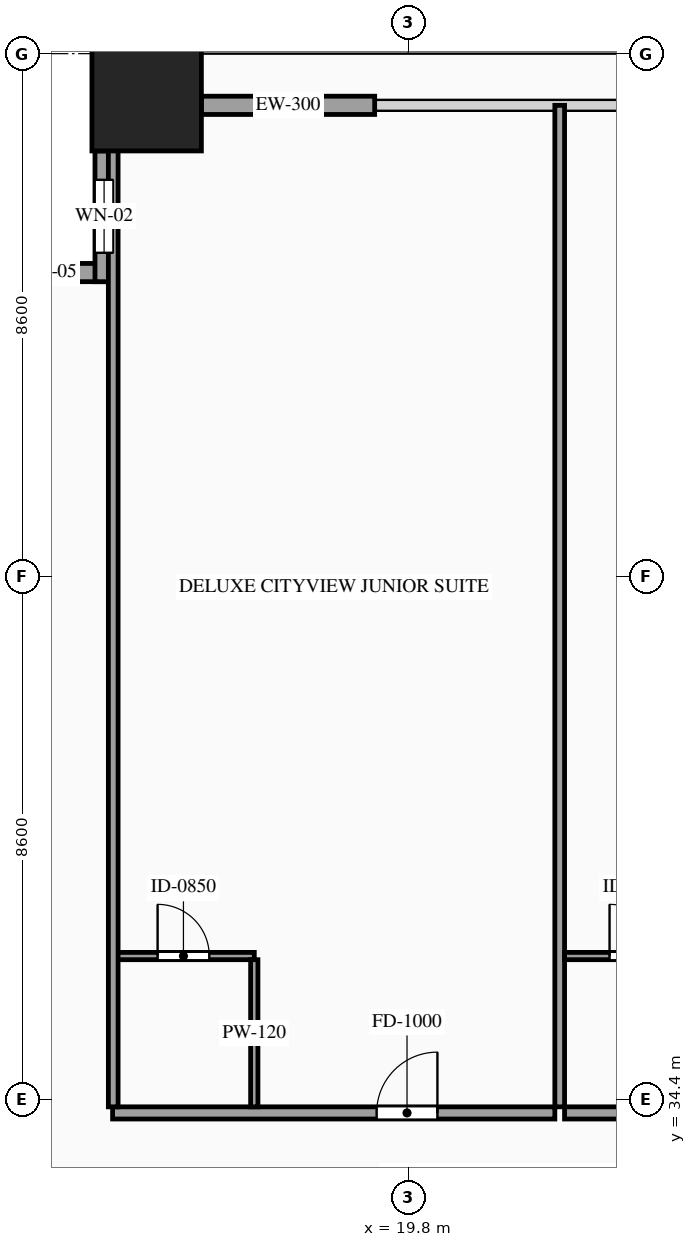
"""IFC4 building model, lengths in metres.
Left out: names, types, materials, properties, quantities, classifications, styles, units other than length and angle.
Written with IfcOpenShell. Run it as: python <this file> out.ifc"""

import sys

from ifc_helpers import new_model, si_unit, direction, frame, frame_2d, origin, origin_2d, place, context, subcontext, project, spatial, rectangle, hollow_rectangle, extrude, source, transform, mapped, element, fill, save


model = new_model("IFC4")
c1 = context("Model", 3, precision=1e-05, world=origin(), true_north=direction((0.0, 1.0)))
c2 = subcontext(c1, "Body", "Model", "MODEL_VIEW")
j1 = project(units=[si_unit("LENGTHUNIT", "METRE"), si_unit("PLANEANGLEUNIT", "RADIAN")], contexts=[c1])
p1 = place(None, origin())
s1 = spatial("IfcSite", under=j1, at=p1, CompositionType="ELEMENT")
p2 = place(p1, origin())
s2 = spatial("IfcBuilding", under=s1, at=p2, CompositionType="ELEMENT")
p3 = place(p2, frame((0.0, 0.0, 37.8)))
s3 = spatial("IfcBuildingStorey", under=s2, at=p3, CompositionType="ELEMENT", Elevation=37.8)
m1 = source(origin(), c2, "Body", "SweptSolid", [
    extrude(hollow_rectangle(XDim=1.8, YDim=1.8, WallThickness=0.08, at=origin_2d()), origin(), (0.0, 0.0, 1.0), 3.6),
])
p4 = place(p3, frame((15.5, 50.9, 0.0), z_axis=(0.0, 0.0, 1.0), x_axis=(1.0, 0.0, 0.0)))
e1 = element("IfcColumn", 1, at=p4, inside=s3, PredefinedType="COLUMN", context=c2, shape_type="MappedRepresentation", body=[
    mapped(m1, transform((0.0, 0.0, 0.0), scale=1.0)),
])
p5 = place(p3, frame((14.95, 48.0, 0.0), z_axis=(0.0, 0.0, 1.0), x_axis=(-1.0, 0.0, 0.0)))
e2 = element("IfcWall", 2, at=p5, inside=s3, PredefinedType="SOLIDWALL", context=c2, shape_type="SweptSolid", body=[
    extrude(rectangle(XDim=2.15, YDim=0.3, at=frame_2d((1.075, 0.0))), origin(), (0.0, 0.0, 1.0), 3.32),
])
p6 = place(p5, frame((0.625, 0.0, 0.85)))
e3 = element("IfcOpeningElement", 3, at=p6, cuts=e2, PredefinedType="OPENING", context=c2, shape_type="SweptSolid", body=[
    extrude(rectangle(XDim=0.9, YDim=1.5, at=frame_2d((0.45, 0.75))), frame((0.0, 0.165, 0.0), z_axis=(0.0, -1.0, 0.0), x_axis=(1.0, 0.0, 0.0)), (0.0, 0.0, 1.0), 0.33),
])
p7 = place(p3, frame((14.8, 50.0, 0.0), z_axis=(0.0, 0.0, 1.0), x_axis=(0.0, -1.0, 0.0)))
e4 = element("IfcWall", 4, at=p7, inside=s3, PredefinedType="SOLIDWALL", context=c2, shape_type="SweptSolid", body=[
    extrude(rectangle(XDim=2.15, YDim=0.3, at=frame_2d((1.075, 0.0))), origin(), (0.0, 0.0, 1.0), 3.32),
])
p8 = place(p7, frame((0.475, 0.0, 0.85)))
e5 = element("IfcOpeningElement", 5, at=p8, cuts=e4, PredefinedType="OPENING", context=c2, shape_type="SweptSolid", body=[
    extrude(rectangle(XDim=1.2, YDim=2.1, at=frame_2d((0.6, 1.05))), frame((0.0, 0.165, 0.0), z_axis=(0.0, -1.0, 0.0), x_axis=(1.0, 0.0, 0.0)), (0.0, 0.0, 1.0), 0.33),
])
m2 = source(origin(), c2, "Body", "SweptSolid", [
    extrude(rectangle(XDim=2.85, YDim=0.3, at=frame_2d((1.425, 0.0))), origin(), (0.0, 0.0, 1.0), 2.715),
])
p9 = place(p3, frame((16.4, 50.75, 0.0), z_axis=(0.0, 0.0, 1.0), x_axis=(1.0, 0.0, 0.0)))
e6 = element("IfcWall", 6, at=p9, inside=s3, PredefinedType="SOLIDWALL", context=c2, shape_type="MappedRepresentation", body=[
    mapped(m2, transform((0.0, 0.0, 0.0), scale=1.0)),
])
p10 = place(p3, frame((14.94, 34.18, 0.0), z_axis=(0.0, 0.0, 1.0), x_axis=(1.0, 0.0, 0.0)))
e7 = element("IfcWall", 7, at=p10, inside=s3, PredefinedType="PARTITIONING", context=c2, shape_type="SweptSolid", body=[
    extrude(rectangle(XDim=7.273, YDim=0.2, at=frame_2d((3.636, 0.0))), origin(), (0.0, 0.0, 1.0), 3.32),
])
p11 = place(p10, frame((4.342, 0.0, 0.0)))
e8 = element("IfcOpeningElement", 8, at=p11, cuts=e7, PredefinedType="OPENING", context=c2, shape_type="SweptSolid", body=[
    extrude(rectangle(XDim=1.0, YDim=2.2, at=frame_2d((0.5, 1.1))), frame((0.0, 0.115, 0.0), z_axis=(0.0, -1.0, 0.0), x_axis=(1.0, 0.0, 0.0)), (0.0, 0.0, 1.0), 0.23),
])
m3 = source(origin(), c2, "Body", "SweptSolid", [
    extrude(rectangle(XDim=16.47, YDim=0.16, at=frame_2d((8.235, 0.0))), origin(), (0.0, 0.0, 1.0), 3.32),
])
p12 = place(p3, frame((22.293, 34.28, 0.0), z_axis=(0.0, 0.0, 1.0), x_axis=(0.0, 1.0, 0.0)))
e9 = element("IfcWall", 9, at=p12, inside=s3, PredefinedType="PARTITIONING", context=c2, shape_type="MappedRepresentation", body=[
    mapped(m3, transform((0.0, 0.0, 0.0), scale=1.0)),
])
p13 = place(p3, frame((14.94, 36.76, 0.0), z_axis=(0.0, 0.0, 1.0), x_axis=(1.0, 0.0, 0.0)))
e10 = element("IfcWall", 10, at=p13, inside=s3, PredefinedType="PARTITIONING", context=c2, shape_type="SweptSolid", body=[
    extrude(rectangle(XDim=2.33, YDim=0.12, at=frame_2d((1.165, 0.0))), origin(), (0.0, 0.0, 1.0), 3.32),
])
p14 = place(p13, frame((0.74, 0.0, 0.0)))
e11 = element("IfcOpeningElement", 11, at=p14, cuts=e10, PredefinedType="OPENING", context=c2, shape_type="SweptSolid", body=[
    extrude(rectangle(XDim=0.85, YDim=2.1, at=frame_2d((0.425, 1.05))), frame((0.0, 0.075, 0.0), z_axis=(0.0, -1.0, 0.0), x_axis=(1.0, 0.0, 0.0)), (0.0, 0.0, 1.0), 0.15),
])
m4 = source(origin(), c2, "Body", "SweptSolid", [
    extrude(rectangle(XDim=2.42, YDim=0.12, at=frame_2d((1.21, 0.0))), origin(), (0.0, 0.0, 1.0), 3.32),
])
p15 = place(p3, frame((17.27, 34.28, 0.0), z_axis=(0.0, 0.0, 1.0), x_axis=(0.0, 1.0, 0.0)))
e12 = element("IfcWall", 12, at=p15, inside=s3, PredefinedType="PARTITIONING", context=c2, shape_type="MappedRepresentation", body=[
    mapped(m4, transform((0.0, 0.0, 0.0), scale=1.0)),
])
p16 = place(p3, frame((22.373, 34.18, 0.0), z_axis=(0.0, 0.0, 1.0), x_axis=(1.0, 0.0, 0.0)))
e13 = element("IfcWall", 13, at=p16, inside=s3, PredefinedType="PARTITIONING", context=c2, shape_type="SweptSolid", body=[
    extrude(rectangle(XDim=7.194, YDim=0.2, at=frame_2d((3.597, 0.0))), origin(), (0.0, 0.0, 1.0), 3.32),
])
p17 = place(p16, frame((4.302, 0.0, 0.0)))
e14 = element("IfcOpeningElement", 14, at=p17, cuts=e13, PredefinedType="OPENING", context=c2, shape_type="SweptSolid", body=[
    extrude(rectangle(XDim=1.0, YDim=2.2, at=frame_2d((0.5, 1.1))), frame((0.0, 0.115, 0.0), z_axis=(0.0, -1.0, 0.0), x_axis=(1.0, 0.0, 0.0)), (0.0, 0.0, 1.0), 0.23),
])
p18 = place(p3, frame((22.373, 36.76, 0.0), z_axis=(0.0, 0.0, 1.0), x_axis=(1.0, 0.0, 0.0)))
e15 = element("IfcWall", 15, at=p18, inside=s3, PredefinedType="PARTITIONING", context=c2, shape_type="SweptSolid", body=[
    extrude(rectangle(XDim=2.33, YDim=0.12, at=frame_2d((1.165, 0.0))), origin(), (0.0, 0.0, 1.0), 3.32),
])
p19 = place(p18, frame((0.74, 0.0, 0.0)))
e16 = element("IfcOpeningElement", 16, at=p19, cuts=e15, PredefinedType="OPENING", context=c2, shape_type="SweptSolid", body=[
    extrude(rectangle(XDim=0.85, YDim=2.1, at=frame_2d((0.425, 1.05))), frame((0.0, 0.075, 0.0), z_axis=(0.0, -1.0, 0.0), x_axis=(1.0, 0.0, 0.0)), (0.0, 0.0, 1.0), 0.15),
])
m5 = source(origin(), c2, "Body", "SweptSolid", [
    extrude(rectangle(XDim=16.32, YDim=0.16, at=frame_2d((8.16, 0.0))), origin(), (0.0, 0.0, 1.0), 3.32),
])
p20 = place(p3, frame((14.95, 34.28, 0.0), z_axis=(0.0, 0.0, 1.0), x_axis=(0.0, 1.0, 0.0)))
e17 = element("IfcWall", 17, at=p20, inside=s3, PredefinedType="PARTITIONING", context=c2, shape_type="MappedRepresentation", body=[
    mapped(m5, transform((0.0, 0.0, 0.0), scale=1.0)),
])
m6 = source(origin(), c2, "Body", "SweptSolid", [
    extrude(rectangle(XDim=0.9, YDim=1.5, at=frame_2d((0.45, 0.75))), frame((0.0, 0.03, 0.0), z_axis=(0.0, -1.0, 0.0), x_axis=(1.0, 0.0, 0.0)), (0.0, 0.0, 1.0), 0.06),
])
p21 = place(p6, origin())
e18 = element("IfcWindow", 18, at=p21, inside=s3, PartitioningType="SINGLE_PANEL", PredefinedType="WINDOW", context=c2, shape_type="MappedRepresentation", body=[
    mapped(m6, transform((0.0, 0.0, 0.0), scale=1.0)),
])
fill(e3, e18)
m7 = source(origin(), c2, "Body", "SweptSolid", [
    extrude(rectangle(XDim=1.2, YDim=2.1, at=frame_2d((0.6, 1.05))), frame((0.0, 0.03, 0.0), z_axis=(0.0, -1.0, 0.0), x_axis=(1.0, 0.0, 0.0)), (0.0, 0.0, 1.0), 0.06),
])
p22 = place(p8, origin())
e19 = element("IfcWindow", 19, at=p22, inside=s3, PartitioningType="SINGLE_PANEL", PredefinedType="WINDOW", context=c2, shape_type="MappedRepresentation", body=[
    mapped(m7, transform((0.0, 0.0, 0.0), scale=1.0)),
])
fill(e5, e19)
m8 = source(origin(), c2, "Body", "SweptSolid", [
    extrude(rectangle(XDim=1.0, YDim=2.2, at=frame_2d((0.5, 1.1))), frame((0.0, 0.025, 0.0), z_axis=(0.0, -1.0, 0.0), x_axis=(1.0, 0.0, 0.0)), (0.0, 0.0, 1.0), 0.05),
])
p23 = place(p11, origin())
e20 = element("IfcDoor", 20, at=p23, inside=s3, OperationType="SINGLE_SWING_RIGHT", PredefinedType="DOOR", context=c2, shape_type="MappedRepresentation", body=[
    mapped(m8, transform((0.0, 0.0, 0.0), scale=1.0)),
])
fill(e8, e20)
m9 = source(origin(), c2, "Body", "SweptSolid", [
    extrude(rectangle(XDim=0.85, YDim=2.1, at=frame_2d((0.425, 1.05))), frame((0.0, 0.025, 0.0), z_axis=(0.0, -1.0, 0.0), x_axis=(1.0, 0.0, 0.0)), (0.0, 0.0, 1.0), 0.05),
])
p24 = place(p14, origin())
e21 = element("IfcDoor", 21, at=p24, inside=s3, OperationType="SINGLE_SWING_LEFT", PredefinedType="DOOR", context=c2, shape_type="MappedRepresentation", body=[
    mapped(m9, transform((0.0, 0.0, 0.0), scale=1.0)),
])
fill(e11, e21)
p25 = place(p19, origin())
e22 = element("IfcDoor", 22, at=p25, inside=s3, OperationType="SINGLE_SWING_LEFT", PredefinedType="DOOR", context=c2, shape_type="MappedRepresentation", body=[
    mapped(m9, transform((0.0, 0.0, 0.0), scale=1.0)),
])
fill(e16, e22)
save(model, sys.argv[1])
